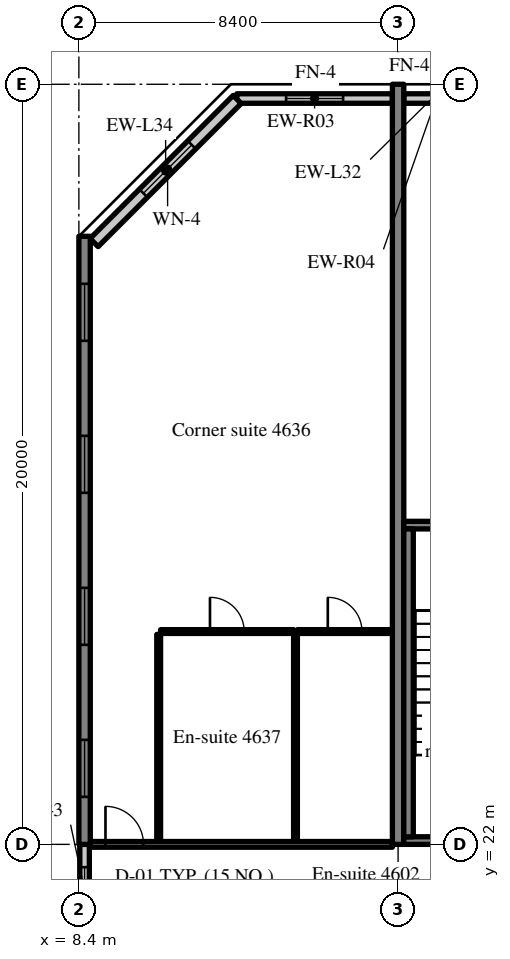
"""IFC4 building model, lengths in metres.
Left out: names, types, materials, properties, quantities, classifications, styles, units other than length and angle.
Written with IfcOpenShell. Run it as: python <this file> out.ifc"""

import sys

from ifc_helpers import new_model, si_unit, direction, frame, frame_2d, origin, place, context, subcontext, project, spatial, rectangle, extrude, source, transform, mapped, element, fill, save


model = new_model("IFC4")
c1 = context("Model", 3, precision=1e-05, world=origin(), true_north=direction((0.0, 1.0)))
c2 = subcontext(c1, "Body", "Model", "MODEL_VIEW")
j1 = project(units=[si_unit("LENGTHUNIT", "METRE"), si_unit("PLANEANGLEUNIT", "RADIAN")], contexts=[c1])
p1 = place(None, origin())
s1 = spatial("IfcSite", under=j1, at=p1, CompositionType="ELEMENT")
p2 = place(p1, origin())
s2 = spatial("IfcBuilding", under=s1, at=p2, CompositionType="ELEMENT")
p3 = place(p2, frame((0.0, 0.0, 189.6)))
s3 = spatial("IfcBuildingStorey", under=s2, at=p3, CompositionType="ELEMENT", Elevation=189.6)
m1 = source(origin(), c2, "Body", "SweptSolid", [
    extrude(rectangle(XDim=16.0, YDim=0.3, at=frame_2d((8.0, 0.0))), origin(), (0.0, 0.0, 1.0), 3.52),
])
p4 = place(p3, frame((8.55, 22.0, 0.0), z_axis=(0.0, 0.0, 1.0), x_axis=(0.0, 1.0, 0.0)))
e1 = element("IfcWall", 1, at=p4, inside=s3, PredefinedType="SHEAR", context=c2, shape_type="MappedRepresentation", body=[
    mapped(m1, transform((0.0, 0.0, 0.0), scale=1.0)),
])
m2 = source(origin(), c2, "Body", "SweptSolid", [
    extrude(rectangle(XDim=1.5, YDim=1.5, at=frame_2d((0.75, 0.75))), frame((0.0, 0.16, 0.0), z_axis=(0.0, -1.0, 0.0), x_axis=(1.0, 0.0, 0.0)), (0.0, 0.0, 1.0), 0.32),
])
p5 = place(p4, frame((1.25, 0.0, 0.9)))
e2 = element("IfcOpeningElement", 2, at=p5, cuts=e1, PredefinedType="OPENING", context=c2, shape_type="MappedRepresentation", body=[
    mapped(m2, transform((0.0, 0.0, 0.0), scale=1.0)),
])
p6 = place(p4, frame((5.25, 0.0, 0.9)))
e3 = element("IfcOpeningElement", 3, at=p6, cuts=e1, PredefinedType="OPENING", context=c2, shape_type="MappedRepresentation", body=[
    mapped(m2, transform((0.0, 0.0, 0.0), scale=1.0)),
])
p7 = place(p4, frame((9.25, 0.0, 0.9)))
e4 = element("IfcOpeningElement", 4, at=p7, cuts=e1, PredefinedType="OPENING", context=c2, shape_type="MappedRepresentation", body=[
    mapped(m2, transform((0.0, 0.0, 0.0), scale=1.0)),
])
p8 = place(p4, frame((13.25, 0.0, 0.9)))
e5 = element("IfcOpeningElement", 5, at=p8, cuts=e1, PredefinedType="OPENING", context=c2, shape_type="MappedRepresentation", body=[
    mapped(m2, transform((0.0, 0.0, 0.0), scale=1.0)),
])
m3 = source(origin(), c2, "Body", "SweptSolid", [
    extrude(rectangle(XDim=20.0, YDim=0.3, at=frame_2d((10.0, 0.0))), origin(), (0.0, 0.0, 1.0), 3.52),
])
p9 = place(p3, frame((16.8, 22.0, 0.0), z_axis=(0.0, 0.0, 1.0), x_axis=(0.0, 1.0, 0.0)))
e6 = element("IfcWall", 6, at=p9, inside=s3, PredefinedType="SHEAR", context=c2, shape_type="MappedRepresentation", body=[
    mapped(m3, transform((0.0, 0.0, 0.0), scale=1.0)),
])
m4 = source(origin(), c2, "Body", "SweptSolid", [
    extrude(rectangle(XDim=4.094, YDim=0.25, at=frame_2d((2.047, 0.0))), origin(), (0.0, 0.0, 1.0), 2.87),
])
p10 = place(p3, frame((16.65, 41.625, 0.0), z_axis=(0.0, 0.0, 1.0), x_axis=(-1.0, 0.0, 0.0)))
e7 = element("IfcWall", 7, at=p10, inside=s3, PredefinedType="SOLIDWALL", context=c2, shape_type="MappedRepresentation", body=[
    mapped(m4, transform((0.0, 0.0, 0.0), scale=1.0)),
])
m5 = source(origin(), c2, "Body", "SweptSolid", [
    extrude(rectangle(XDim=1.5, YDim=1.5, at=frame_2d((0.75, 0.75))), frame((0.0, 0.135, 0.0), z_axis=(0.0, -1.0, 0.0), x_axis=(1.0, 0.0, 0.0)), (0.0, 0.0, 1.0), 0.27),
])
p11 = place(p10, frame((1.297, 0.0, 0.9)))
e8 = element("IfcOpeningElement", 8, at=p11, cuts=e7, PredefinedType="OPENING", context=c2, shape_type="MappedRepresentation", body=[
    mapped(m5, transform((0.0, 0.0, 0.0), scale=1.0)),
])
m6 = source(origin(), c2, "Body", "SweptSolid", [
    extrude(rectangle(XDim=1.708, YDim=0.25, at=frame_2d((0.854, 0.0))), origin(), (0.0, 0.0, 1.0), 2.87),
])
p12 = place(p3, frame((18.658, 41.625, 0.0), z_axis=(0.0, 0.0, 1.0), x_axis=(-1.0, 0.0, 0.0)))
e9 = element("IfcWall", 9, at=p12, inside=s3, PredefinedType="SOLIDWALL", context=c2, shape_type="MappedRepresentation", body=[
    mapped(m6, transform((0.0, 0.0, 0.0), scale=1.0)),
])
m7 = source(origin(), c2, "Body", "SweptSolid", [
    extrude(rectangle(XDim=5.326, YDim=0.3, at=frame_2d((2.663, 0.0))), origin(), (0.0, 0.0, 1.0), 3.52),
])
p13 = place(p3, frame((12.566, 41.6, 0.0), z_axis=(0.0, 0.0, 1.0), x_axis=(-0.707083859269, -0.707129702361, 0.0)))
e10 = element("IfcWall", 10, at=p13, inside=s3, PredefinedType="SOLIDWALL", context=c2, shape_type="MappedRepresentation", body=[
    mapped(m7, transform((0.0, 0.0, 0.0), scale=1.0)),
])
m8 = source(origin(), c2, "Body", "SweptSolid", [
    extrude(rectangle(XDim=1.8, YDim=1.5, at=frame_2d((0.9, 0.75))), frame((0.0, 0.16, 0.0), z_axis=(0.0, -1.0, 0.0), x_axis=(1.0, 0.0, 0.0)), (0.0, 0.0, 1.0), 0.32),
])
p14 = place(p13, frame((1.689, 0.0, 0.9)))
e11 = element("IfcOpeningElement", 11, at=p14, cuts=e10, PredefinedType="OPENING", context=c2, shape_type="MappedRepresentation", body=[
    mapped(m8, transform((0.0, 0.0, 0.0), scale=1.0)),
])
m9 = source(origin(), c2, "Body", "SweptSolid", [
    extrude(rectangle(XDim=2.4, YDim=0.25, at=frame_2d((1.2, 0.0))), origin(), (0.0, 0.0, 1.0), 2.62),
])
p15 = place(p3, frame((8.55, 19.6, 0.0), z_axis=(0.0, 0.0, 1.0), x_axis=(0.0, 1.0, 0.0)))
e12 = element("IfcWall", 12, at=p15, inside=s3, PredefinedType="SOLIDWALL", context=c2, shape_type="MappedRepresentation", body=[
    mapped(m9, transform((0.0, 0.0, 0.0), scale=1.0)),
])
m10 = source(origin(), c2, "Body", "SweptSolid", [
    extrude(rectangle(XDim=1.2, YDim=1.5, at=frame_2d((0.6, 0.75))), frame((0.0, 0.135, 0.0), z_axis=(0.0, -1.0, 0.0), x_axis=(1.0, 0.0, 0.0)), (0.0, 0.0, 1.0), 0.27),
])
p16 = place(p15, frame((0.6, 0.0, 0.9)))
e13 = element("IfcOpeningElement", 13, at=p16, cuts=e12, PredefinedType="OPENING", context=c2, shape_type="MappedRepresentation", body=[
    mapped(m10, transform((0.0, 0.0, 0.0), scale=1.0)),
])
m11 = source(origin(), c2, "Body", "SweptSolid", [
    extrude(rectangle(XDim=8.25, YDim=0.2, at=frame_2d((4.125, 0.0))), origin(), (0.0, 0.0, 1.0), 3.52),
])
p17 = place(p3, frame((16.95, 22.1, 0.0), z_axis=(0.0, 0.0, 1.0), x_axis=(1.0, 0.0, 0.0)))
e14 = element("IfcWall", 14, at=p17, inside=s3, PredefinedType="SOLIDWALL", context=c2, shape_type="MappedRepresentation", body=[
    mapped(m11, transform((0.0, 0.0, 0.0), scale=1.0)),
])
m12 = source(origin(), c2, "Body", "SweptSolid", [
    extrude(rectangle(XDim=1.2, YDim=2.1, at=frame_2d((0.6, 1.05))), frame((0.0, 0.11, 0.0), z_axis=(0.0, -1.0, 0.0), x_axis=(1.0, 0.0, 0.0)), (0.0, 0.0, 1.0), 0.22),
])
p18 = place(p17, frame((6.05, 0.0, 0.0)))
e15 = element("IfcOpeningElement", 15, at=p18, cuts=e14, PredefinedType="OPENING", context=c2, shape_type="MappedRepresentation", body=[
    mapped(m12, transform((0.0, 0.0, 0.0), scale=1.0)),
])
p19 = place(p3, frame((16.95, 30.4, 0.0), z_axis=(0.0, 0.0, 1.0), x_axis=(1.0, 0.0, 0.0)))
e16 = element("IfcWall", 16, at=p19, inside=s3, PredefinedType="SOLIDWALL", context=c2, shape_type="MappedRepresentation", body=[
    mapped(m11, transform((0.0, 0.0, 0.0), scale=1.0)),
])
m13 = source(origin(), c2, "Body", "SweptSolid", [
    extrude(rectangle(XDim=1.0, YDim=2.1, at=frame_2d((0.5, 1.05))), frame((0.0, 0.11, 0.0), z_axis=(0.0, -1.0, 0.0), x_axis=(1.0, 0.0, 0.0)), (0.0, 0.0, 1.0), 0.22),
])
p20 = place(p19, frame((6.15, 0.0, 0.0)))
e17 = element("IfcOpeningElement", 17, at=p20, cuts=e16, PredefinedType="OPENING", context=c2, shape_type="MappedRepresentation", body=[
    mapped(m13, transform((0.0, 0.0, 0.0), scale=1.0)),
])
m14 = source(origin(), c2, "Body", "SweptSolid", [
    extrude(rectangle(XDim=8.1, YDim=0.25, at=frame_2d((4.05, 0.0))), origin(), (0.0, 0.0, 1.0), 3.52),
])
p21 = place(p3, frame((17.075, 22.2, 0.0), z_axis=(0.0, 0.0, 1.0), x_axis=(0.0, 1.0, 0.0)))
e18 = element("IfcWall", 18, at=p21, inside=s3, PredefinedType="SOLIDWALL", context=c2, shape_type="MappedRepresentation", body=[
    mapped(m14, transform((0.0, 0.0, 0.0), scale=1.0)),
])
m15 = source(origin(), c2, "Body", "SweptSolid", [
    extrude(rectangle(XDim=5.45, YDim=0.1, at=frame_2d((2.725, 0.0))), origin(), (0.0, 0.0, 1.0), 3.52),
])
for number, where, z_axis, x_axis in (
    (19, (10.5, 22.075, 0.0), (0.0, 0.0, 1.0), (0.0, 1.0, 0.0)),
    (20, (14.1, 22.075, 0.0), (0.0, 0.0, 1.0), (0.0, 1.0, 0.0)),
):
    element("IfcWall", number, at=place(p3, frame(where, z_axis=z_axis, x_axis=x_axis)), inside=s3, PredefinedType="PARTITIONING", context=c2, shape_type="MappedRepresentation", body=[
        mapped(m15, transform((0.0, 0.0, 0.0), scale=1.0)),
    ])
m16 = source(origin(), c2, "Body", "SweptSolid", [
    extrude(rectangle(XDim=3.5, YDim=0.1, at=frame_2d((1.75, 0.0))), origin(), (0.0, 0.0, 1.0), 3.52),
])
p22 = place(p3, frame((10.55, 27.6, 0.0), z_axis=(0.0, 0.0, 1.0), x_axis=(1.0, 0.0, 0.0)))
e21 = element("IfcWall", 21, at=p22, inside=s3, PredefinedType="PARTITIONING", context=c2, shape_type="MappedRepresentation", body=[
    mapped(m16, transform((0.0, 0.0, 0.0), scale=1.0)),
])
m17 = source(origin(), c2, "Body", "SweptSolid", [
    extrude(rectangle(XDim=0.9, YDim=2.1, at=frame_2d((0.45, 1.05))), frame((0.0, 0.06, 0.0), z_axis=(0.0, -1.0, 0.0), x_axis=(1.0, 0.0, 0.0)), (0.0, 0.0, 1.0), 0.12),
])
p23 = place(p22, frame((1.3, 0.0, 0.0)))
e22 = element("IfcOpeningElement", 22, at=p23, cuts=e21, PredefinedType="OPENING", context=c2, shape_type="MappedRepresentation", body=[
    mapped(m17, transform((0.0, 0.0, 0.0), scale=1.0)),
])
m18 = source(origin(), c2, "Body", "SweptSolid", [
    extrude(rectangle(XDim=2.5, YDim=0.1, at=frame_2d((1.25, 0.0))), origin(), (0.0, 0.0, 1.0), 3.52),
])
p24 = place(p3, frame((14.15, 27.6, 0.0), z_axis=(0.0, 0.0, 1.0), x_axis=(1.0, 0.0, 0.0)))
e23 = element("IfcWall", 23, at=p24, inside=s3, PredefinedType="PARTITIONING", context=c2, shape_type="MappedRepresentation", body=[
    mapped(m18, transform((0.0, 0.0, 0.0), scale=1.0)),
])
p25 = place(p24, frame((0.8, 0.0, 0.0)))
e24 = element("IfcOpeningElement", 24, at=p25, cuts=e23, PredefinedType="OPENING", context=c2, shape_type="MappedRepresentation", body=[
    mapped(m17, transform((0.0, 0.0, 0.0), scale=1.0)),
])
m19 = source(origin(), c2, "Body", "SweptSolid", [
    extrude(rectangle(XDim=7.95, YDim=0.15, at=frame_2d((3.975, 0.0))), origin(), (0.0, 0.0, 1.0), 2.82),
])
p26 = place(p3, frame((8.7, 22.0, 0.0), z_axis=(0.0, 0.0, 1.0), x_axis=(1.0, 0.0, 0.0)))
e25 = element("IfcWall", 25, at=p26, inside=s3, PredefinedType="PARTITIONING", context=c2, shape_type="MappedRepresentation", body=[
    mapped(m19, transform((0.0, 0.0, 0.0), scale=1.0)),
])
m20 = source(origin(), c2, "Body", "SweptSolid", [
    extrude(rectangle(XDim=1.0, YDim=2.1, at=frame_2d((0.5, 1.05))), frame((0.0, 0.085, 0.0), z_axis=(0.0, -1.0, 0.0), x_axis=(1.0, 0.0, 0.0)), (0.0, 0.0, 1.0), 0.17),
])
p27 = place(p26, frame((0.4, 0.0, 0.0)))
e26 = element("IfcOpeningElement", 26, at=p27, cuts=e25, PredefinedType="OPENING", context=c2, shape_type="MappedRepresentation", body=[
    mapped(m20, transform((0.0, 0.0, 0.0), scale=1.0)),
])
m21 = source(origin(), c2, "Body", "SweptSolid", [
    extrude(rectangle(XDim=1.5, YDim=1.5, at=frame_2d((0.75, 0.75))), frame((0.0, 0.03, 0.0), z_axis=(0.0, -1.0, 0.0), x_axis=(1.0, 0.0, 0.0)), (0.0, 0.0, 1.0), 0.06),
])
p28 = place(p11, origin())
e27 = element("IfcWindow", 27, at=p28, inside=s3, PartitioningType="SINGLE_PANEL", PredefinedType="WINDOW", context=c2, shape_type="MappedRepresentation", body=[
    mapped(m21, transform((0.0, 0.0, 0.0), scale=1.0)),
])
fill(e8, e27)
m22 = source(origin(), c2, "Body", "SweptSolid", [
    extrude(rectangle(XDim=1.8, YDim=1.5, at=frame_2d((0.9, 0.75))), frame((0.0, 0.03, 0.0), z_axis=(0.0, -1.0, 0.0), x_axis=(1.0, 0.0, 0.0)), (0.0, 0.0, 1.0), 0.06),
])
p29 = place(p14, origin())
e28 = element("IfcWindow", 28, at=p29, inside=s3, PartitioningType="SINGLE_PANEL", PredefinedType="WINDOW", context=c2, shape_type="MappedRepresentation", body=[
    mapped(m22, transform((0.0, 0.0, 0.0), scale=1.0)),
])
fill(e11, e28)
p30 = place(p5, origin())
e29 = element("IfcWindow", 29, at=p30, inside=s3, PartitioningType="SINGLE_PANEL", PredefinedType="WINDOW", context=c2, shape_type="MappedRepresentation", body=[
    mapped(m21, transform((0.0, 0.0, 0.0), scale=1.0)),
])
fill(e2, e29)
p31 = place(p6, origin())
e30 = element("IfcWindow", 30, at=p31, inside=s3, PartitioningType="SINGLE_PANEL", PredefinedType="WINDOW", context=c2, shape_type="MappedRepresentation", body=[
    mapped(m21, transform((0.0, 0.0, 0.0), scale=1.0)),
])
fill(e3, e30)
p32 = place(p7, origin())
e31 = element("IfcWindow", 31, at=p32, inside=s3, PartitioningType="SINGLE_PANEL", PredefinedType="WINDOW", context=c2, shape_type="MappedRepresentation", body=[
    mapped(m21, transform((0.0, 0.0, 0.0), scale=1.0)),
])
fill(e4, e31)
p33 = place(p8, origin())
e32 = element("IfcWindow", 32, at=p33, inside=s3, PartitioningType="SINGLE_PANEL", PredefinedType="WINDOW", context=c2, shape_type="MappedRepresentation", body=[
    mapped(m21, transform((0.0, 0.0, 0.0), scale=1.0)),
])
fill(e5, e32)
m23 = source(origin(), c2, "Body", "SweptSolid", [
    extrude(rectangle(XDim=1.2, YDim=1.5, at=frame_2d((0.6, 0.75))), frame((0.0, 0.03, 0.0), z_axis=(0.0, -1.0, 0.0), x_axis=(1.0, 0.0, 0.0)), (0.0, 0.0, 1.0), 0.06),
])
p34 = place(p16, origin())
e33 = element("IfcWindow", 33, at=p34, inside=s3, PartitioningType="SINGLE_PANEL", PredefinedType="WINDOW", context=c2, shape_type="MappedRepresentation", body=[
    mapped(m23, transform((0.0, 0.0, 0.0), scale=1.0)),
])
fill(e13, e33)
m24 = source(origin(), c2, "Body", "SweptSolid", [
    extrude(rectangle(XDim=0.9, YDim=2.1, at=frame_2d((0.45, 1.05))), frame((0.0, 0.025, 0.0), z_axis=(0.0, -1.0, 0.0), x_axis=(1.0, 0.0, 0.0)), (0.0, 0.0, 1.0), 0.05),
])
p35 = place(p23, origin())
e34 = element("IfcDoor", 34, at=p35, inside=s3, OperationType="SINGLE_SWING_LEFT", PredefinedType="DOOR", context=c2, shape_type="MappedRepresentation", body=[
    mapped(m24, transform((0.0, 0.0, 0.0), scale=1.0)),
])
fill(e22, e34)
p36 = place(p25, origin())
e35 = element("IfcDoor", 35, at=p36, inside=s3, OperationType="SINGLE_SWING_LEFT", PredefinedType="DOOR", context=c2, shape_type="MappedRepresentation", body=[
    mapped(m24, transform((0.0, 0.0, 0.0), scale=1.0)),
])
fill(e24, e35)
m25 = source(origin(), c2, "Body", "SweptSolid", [
    extrude(rectangle(XDim=1.0, YDim=2.1, at=frame_2d((0.5, 1.05))), frame((0.0, 0.025, 0.0), z_axis=(0.0, -1.0, 0.0), x_axis=(1.0, 0.0, 0.0)), (0.0, 0.0, 1.0), 0.05),
])
p37 = place(p27, origin())
e36 = element("IfcDoor", 36, at=p37, inside=s3, OperationType="SINGLE_SWING_LEFT", PredefinedType="DOOR", context=c2, shape_type="MappedRepresentation", body=[
    mapped(m25, transform((0.0, 0.0, 0.0), scale=1.0)),
])
fill(e26, e36)
save(model, sys.argv[1])
